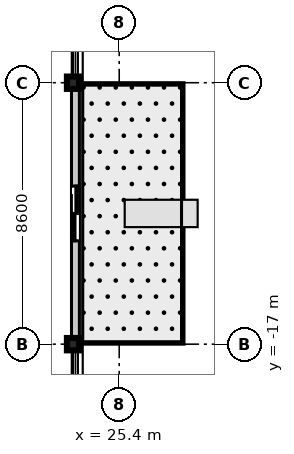
"""IFC4 building model, lengths in metres.
Left out: names, types, materials, properties, quantities, classifications, styles, units other than length and angle.
Written with IfcOpenShell. Run it as: python <this file> out.ifc"""

import sys

from ifc_helpers import new_model, si_unit, direction, frame, frame_2d, origin, origin_2d, place, context, subcontext, project, spatial, rectangle, i_section, extrude, source, transform, mapped, element, fill, save


model = new_model("IFC4")
c1 = context("Model", 3, precision=1e-05, world=origin(), true_north=direction((0.0, 1.0)))
c2 = subcontext(c1, "Body", "Model", "MODEL_VIEW")
j1 = project(units=[si_unit("LENGTHUNIT", "METRE"), si_unit("PLANEANGLEUNIT", "RADIAN")], contexts=[c1])
p1 = place(None, origin())
s1 = spatial("IfcSite", under=j1, at=p1, CompositionType="ELEMENT")
p2 = place(p1, origin())
s2 = spatial("IfcBuilding", under=s1, at=p2, CompositionType="ELEMENT")
p3 = place(p2, frame((0.0, 0.0, 204.9)))
s3 = spatial("IfcBuildingStorey", under=s2, at=p3, CompositionType="ELEMENT", Elevation=204.9)
m1 = source(origin(), c2, "Body", "SweptSolid", [
    extrude(i_section(OverallWidth=0.401, OverallDepth=0.406, WebThickness=0.016, FlangeThickness=0.025, at=origin_2d()), origin(), (0.0, 0.0, 1.0), 3.655),
])
for number, where, z_axis, x_axis in (
    (1, (23.88, -17.0, 0.0), (0.0, 0.0, 1.0), (1.0, 0.0, 0.0)),
    (2, (23.88, -8.4, 0.0), (0.0, 0.0, 1.0), (1.0, 0.0, 0.0)),
):
    element("IfcColumn", number, at=place(p3, frame(where, z_axis=z_axis, x_axis=x_axis)), inside=s3, PredefinedType="COLUMN", context=c2, shape_type="MappedRepresentation", body=[
        mapped(m1, transform((0.0, 0.0, 0.0), scale=1.0)),
    ])
m2 = source(origin(), c2, "Body", "SweptSolid", [
    extrude(rectangle(XDim=8.6, YDim=0.26, at=frame_2d((4.3, 0.0))), origin(), (0.0, 0.0, 1.0), 2.89),
])
p4 = place(p3, frame((23.96, -17.0, 0.0), z_axis=(0.0, 0.0, 1.0), x_axis=(0.0, 1.0, 0.0)))
e3 = element("IfcWall", 3, at=p4, inside=s3, PredefinedType="STANDARD", context=c2, shape_type="MappedRepresentation", body=[
    mapped(m2, transform((0.0, 0.0, 0.0), scale=1.0)),
])
p5 = place(p4, frame((3.4, 0.0, 0.0)))
e4 = element("IfcOpeningElement", 4, at=p5, cuts=e3, PredefinedType="OPENING", context=c2, shape_type="SweptSolid", body=[
    extrude(rectangle(XDim=1.8, YDim=2.25, at=frame_2d((0.9, 1.125))), frame((0.0, 0.14, 0.0), z_axis=(0.0, -1.0, 0.0), x_axis=(1.0, 0.0, 0.0)), (0.0, 0.0, 1.0), 0.28),
])
m3 = source(origin(), c2, "Body", "SweptSolid", [
    extrude(rectangle(XDim=1.8, YDim=2.25, at=frame_2d((0.9, 1.125))), frame((0.0, 0.025, 0.0), z_axis=(0.0, -1.0, 0.0), x_axis=(1.0, 0.0, 0.0)), (0.0, 0.0, 1.0), 0.05),
])
p6 = place(p5, frame((1.8, 0.0, 0.0), z_axis=(0.0, 0.0, 1.0), x_axis=(-1.0, 0.0, 0.0)))
e5 = element("IfcDoor", 5, at=p6, inside=s3, OperationType="DOUBLE_DOOR_SLIDING", PredefinedType="DOOR", context=c2, shape_type="MappedRepresentation", body=[
    mapped(m3, transform((0.0, 0.0, 0.0), scale=1.0)),
])
fill(e4, e5)
save(model, sys.argv[1])
